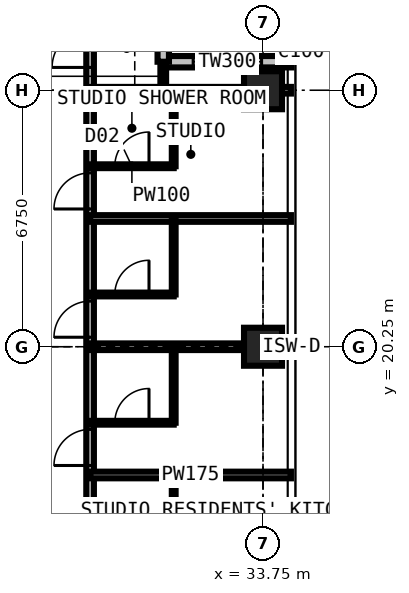
"""IFC4 building model, lengths in metres.
Left out: names, types, materials, properties, quantities, classifications, styles, units other than length and angle.
Written with IfcOpenShell. Run it as: python <this file> out.ifc"""

import sys

from ifc_helpers import new_model, si_unit, direction, frame, frame_2d, origin, origin_2d, place, context, subcontext, project, spatial, rectangle, extrude, element, fill, save


model = new_model("IFC4")
c1 = context("Model", 3, precision=1e-05, world=origin(), true_north=direction((0.0, 1.0)))
c2 = subcontext(c1, "Body", "Model", "MODEL_VIEW")
j1 = project(units=[si_unit("LENGTHUNIT", "METRE"), si_unit("PLANEANGLEUNIT", "RADIAN")], contexts=[c1])
p1 = place(None, origin())
s1 = spatial("IfcSite", under=j1, at=p1, CompositionType="ELEMENT")
p2 = place(p1, origin())
s2 = spatial("IfcBuilding", under=s1, at=p2, CompositionType="ELEMENT")
p3 = place(p2, frame((0.0, 0.0, 247.5)))
s3 = spatial("IfcBuildingStorey", under=s2, at=p3, CompositionType="ELEMENT", Elevation=247.5)
for number, where, z_axis, x_axis in (
    (1, (33.75, 20.25, 0.0), (0.0, 0.0, 1.0), (1.0, 0.0, 0.0)),
    (2, (33.75, 27.0, 0.0), (0.0, 0.0, 1.0), (1.0, 0.0, 0.0)),
):
    element("IfcColumn", number, at=place(p3, frame(where, z_axis=z_axis, x_axis=x_axis)), inside=s3, PredefinedType="COLUMN", context=c2, shape_type="SweptSolid", body=[
        extrude(rectangle(XDim=1.0, YDim=1.0, at=origin_2d()), origin(), (0.0, 0.0, 1.0), 3.6),
    ])
p4 = place(p3, frame((34.5, 27.75, 0.0), z_axis=(0.0, 0.0, 1.0), x_axis=(-1.0, 0.0, 0.0)))
e3 = element("IfcWall", 3, at=p4, inside=s3, PredefinedType="SOLIDWALL", context=c2, shape_type="SweptSolid", body=[
    extrude(rectangle(XDim=3.375, YDim=0.3, at=frame_2d((1.688, 0.0))), origin(), (0.0, 0.0, 1.0), 3.375),
])
p5 = place(p4, frame((0.788, 0.0, 0.6)))
e4 = element("IfcOpeningElement", 4, at=p5, cuts=e3, PredefinedType="OPENING", context=c2, shape_type="SweptSolid", body=[
    extrude(rectangle(XDim=1.8, YDim=2.1, at=frame_2d((0.9, 1.05))), frame((0.0, 0.16, 0.0), z_axis=(0.0, -1.0, 0.0), x_axis=(1.0, 0.0, 0.0)), (0.0, 0.0, 1.0), 0.32),
])
p6 = place(p3, frame((31.125, 27.75, 0.0), z_axis=(0.0, 0.0, 1.0), x_axis=(0.0, 1.0, 0.0)))
e5 = element("IfcWall", 5, at=p6, inside=s3, PredefinedType="SOLIDWALL", context=c2, shape_type="SweptSolid", body=[
    extrude(rectangle(XDim=3.375, YDim=0.3, at=frame_2d((1.688, 0.0))), origin(), (0.0, 0.0, 1.0), 3.375),
])
p7 = place(p6, frame((1.663, 0.0, 0.9)))
e6 = element("IfcOpeningElement", 6, at=p7, cuts=e5, PredefinedType="OPENING", context=c2, shape_type="SweptSolid", body=[
    extrude(rectangle(XDim=1.5, YDim=1.8, at=frame_2d((0.75, 0.9))), frame((0.0, 0.16, 0.0), z_axis=(0.0, -1.0, 0.0), x_axis=(1.0, 0.0, 0.0)), (0.0, 0.0, 1.0), 0.32),
])
p8 = place(p3, frame((29.2, 11.3, 0.0), z_axis=(0.0, 0.0, 1.0), x_axis=(0.0, 1.0, 0.0)))
e7 = element("IfcWall", 7, at=p8, inside=s3, PredefinedType="PARTITIONING", context=c2, shape_type="SweptSolid", body=[
    extrude(rectangle(XDim=17.9, YDim=0.2, at=frame_2d((8.95, 0.0))), origin(), (0.0, 0.0, 1.0), 3.375),
])
p9 = place(p8, frame((0.6, 0.0, 0.0)))
e8 = element("IfcOpeningElement", 8, at=p9, cuts=e7, PredefinedType="OPENING", context=c2, shape_type="SweptSolid", body=[
    extrude(rectangle(XDim=1.0, YDim=2.2, at=frame_2d((0.5, 1.1))), frame((0.0, 0.11, 0.0), z_axis=(0.0, -1.0, 0.0), x_axis=(1.0, 0.0, 0.0)), (0.0, 0.0, 1.0), 0.22),
])
p10 = place(p8, frame((2.4, 0.0, 0.0)))
e9 = element("IfcOpeningElement", 9, at=p10, cuts=e7, PredefinedType="OPENING", context=c2, shape_type="SweptSolid", body=[
    extrude(rectangle(XDim=0.95, YDim=2.2, at=frame_2d((0.475, 1.1))), frame((0.0, 0.11, 0.0), z_axis=(0.0, -1.0, 0.0), x_axis=(1.0, 0.0, 0.0)), (0.0, 0.0, 1.0), 0.22),
])
p11 = place(p8, frame((5.825, 0.0, 0.0)))
e10 = element("IfcOpeningElement", 10, at=p11, cuts=e7, PredefinedType="OPENING", context=c2, shape_type="SweptSolid", body=[
    extrude(rectangle(XDim=0.95, YDim=2.2, at=frame_2d((0.475, 1.1))), frame((0.0, 0.11, 0.0), z_axis=(0.0, -1.0, 0.0), x_axis=(1.0, 0.0, 0.0)), (0.0, 0.0, 1.0), 0.22),
])
p12 = place(p8, frame((9.2, 0.0, 0.0)))
e11 = element("IfcOpeningElement", 11, at=p12, cuts=e7, PredefinedType="OPENING", context=c2, shape_type="SweptSolid", body=[
    extrude(rectangle(XDim=0.95, YDim=2.2, at=frame_2d((0.475, 1.1))), frame((0.0, 0.11, 0.0), z_axis=(0.0, -1.0, 0.0), x_axis=(1.0, 0.0, 0.0)), (0.0, 0.0, 1.0), 0.22),
])
p13 = place(p8, frame((12.575, 0.0, 0.0)))
e12 = element("IfcOpeningElement", 12, at=p13, cuts=e7, PredefinedType="OPENING", context=c2, shape_type="SweptSolid", body=[
    extrude(rectangle(XDim=0.95, YDim=2.2, at=frame_2d((0.475, 1.1))), frame((0.0, 0.11, 0.0), z_axis=(0.0, -1.0, 0.0), x_axis=(1.0, 0.0, 0.0)), (0.0, 0.0, 1.0), 0.22),
])
p14 = place(p8, frame((16.3, 0.0, 0.0)))
e13 = element("IfcOpeningElement", 13, at=p14, cuts=e7, PredefinedType="OPENING", context=c2, shape_type="SweptSolid", body=[
    extrude(rectangle(XDim=1.0, YDim=2.2, at=frame_2d((0.5, 1.1))), frame((0.0, 0.11, 0.0), z_axis=(0.0, -1.0, 0.0), x_axis=(1.0, 0.0, 0.0)), (0.0, 0.0, 1.0), 0.22),
])
p15 = place(p3, frame((29.2, 16.875, 0.0), z_axis=(0.0, 0.0, 1.0), x_axis=(1.0, 0.0, 0.0)))
e14 = element("IfcWall", 14, at=p15, inside=s3, PredefinedType="PARTITIONING", context=c2, shape_type="SweptSolid", body=[
    extrude(rectangle(XDim=5.284, YDim=0.175, at=frame_2d((2.642, 0.0))), origin(), (0.0, 0.0, 1.0), 3.375),
])
p16 = place(p3, frame((29.2, 18.25, 0.0), z_axis=(0.0, 0.0, 1.0), x_axis=(1.0, 0.0, 0.0)))
e15 = element("IfcWall", 15, at=p16, inside=s3, PredefinedType="PARTITIONING", context=c2, shape_type="SweptSolid", body=[
    extrude(rectangle(XDim=2.2, YDim=0.1, at=frame_2d((1.1, 0.0))), origin(), (0.0, 0.0, 1.0), 3.375),
])
p17 = place(p16, frame((0.65, 0.0, 0.0)))
e16 = element("IfcOpeningElement", 16, at=p17, cuts=e15, PredefinedType="OPENING", context=c2, shape_type="SweptSolid", body=[
    extrude(rectangle(XDim=0.9, YDim=2.2, at=frame_2d((0.45, 1.1))), frame((0.0, 0.06, 0.0), z_axis=(0.0, -1.0, 0.0), x_axis=(1.0, 0.0, 0.0)), (0.0, 0.0, 1.0), 0.12),
])
p18 = place(p3, frame((29.2, 20.25, 0.0), z_axis=(0.0, 0.0, 1.0), x_axis=(1.0, 0.0, 0.0)))
e17 = element("IfcWall", 17, at=p18, inside=s3, PredefinedType="PARTITIONING", context=c2, shape_type="SweptSolid", body=[
    extrude(rectangle(XDim=5.284, YDim=0.175, at=frame_2d((2.642, 0.0))), origin(), (0.0, 0.0, 1.0), 2.877),
])
p19 = place(p3, frame((29.2, 21.625, 0.0), z_axis=(0.0, 0.0, 1.0), x_axis=(1.0, 0.0, 0.0)))
e18 = element("IfcWall", 18, at=p19, inside=s3, PredefinedType="PARTITIONING", context=c2, shape_type="SweptSolid", body=[
    extrude(rectangle(XDim=2.2, YDim=0.1, at=frame_2d((1.1, 0.0))), origin(), (0.0, 0.0, 1.0), 3.375),
])
p20 = place(p19, frame((0.65, 0.0, 0.0)))
e19 = element("IfcOpeningElement", 19, at=p20, cuts=e18, PredefinedType="OPENING", context=c2, shape_type="SweptSolid", body=[
    extrude(rectangle(XDim=0.9, YDim=2.2, at=frame_2d((0.45, 1.1))), frame((0.0, 0.06, 0.0), z_axis=(0.0, -1.0, 0.0), x_axis=(1.0, 0.0, 0.0)), (0.0, 0.0, 1.0), 0.12),
])
p21 = place(p3, frame((29.2, 23.625, 0.0), z_axis=(0.0, 0.0, 1.0), x_axis=(1.0, 0.0, 0.0)))
e20 = element("IfcWall", 20, at=p21, inside=s3, PredefinedType="PARTITIONING", context=c2, shape_type="SweptSolid", body=[
    extrude(rectangle(XDim=5.284, YDim=0.175, at=frame_2d((2.642, 0.0))), origin(), (0.0, 0.0, 1.0), 3.375),
])
p22 = place(p3, frame((29.2, 25.0, 0.0), z_axis=(0.0, 0.0, 1.0), x_axis=(1.0, 0.0, 0.0)))
e21 = element("IfcWall", 21, at=p22, inside=s3, PredefinedType="PARTITIONING", context=c2, shape_type="SweptSolid", body=[
    extrude(rectangle(XDim=2.2, YDim=0.1, at=frame_2d((1.1, 0.0))), origin(), (0.0, 0.0, 1.0), 3.375),
])
p23 = place(p22, frame((0.65, 0.0, 0.0)))
e22 = element("IfcOpeningElement", 22, at=p23, cuts=e21, PredefinedType="OPENING", context=c2, shape_type="SweptSolid", body=[
    extrude(rectangle(XDim=0.9, YDim=2.2, at=frame_2d((0.45, 1.1))), frame((0.0, 0.06, 0.0), z_axis=(0.0, -1.0, 0.0), x_axis=(1.0, 0.0, 0.0)), (0.0, 0.0, 1.0), 0.12),
])
p24 = place(p3, frame((29.2, 27.0, 0.0), z_axis=(0.0, 0.0, 1.0), x_axis=(1.0, 0.0, 0.0)))
e23 = element("IfcWall", 23, at=p24, inside=s3, PredefinedType="PARTITIONING", context=c2, shape_type="SweptSolid", body=[
    extrude(rectangle(XDim=5.284, YDim=0.175, at=frame_2d((2.642, 0.0))), origin(), (0.0, 0.0, 1.0), 2.877),
])
p25 = place(p3, frame((31.125, 27.0, 0.0), z_axis=(0.0, 0.0, 1.0), x_axis=(0.0, 1.0, 0.0)))
e24 = element("IfcWall", 24, at=p25, inside=s3, PredefinedType="PARTITIONING", context=c2, shape_type="SweptSolid", body=[
    extrude(rectangle(XDim=0.734, YDim=0.15, at=frame_2d((0.367, 0.0))), origin(), (0.0, 0.0, 1.0), 3.375),
])
for number, where, z_axis, x_axis in (
    (25, (31.4, 14.875, 0.0), (0.0, 0.0, 1.0), (0.0, 1.0, 0.0)),
    (26, (31.4, 18.25, 0.0), (0.0, 0.0, 1.0), (0.0, 1.0, 0.0)),
    (27, (31.4, 21.625, 0.0), (0.0, 0.0, 1.0), (0.0, 1.0, 0.0)),
    (28, (31.4, 25.0, 0.0), (0.0, 0.0, 1.0), (0.0, 1.0, 0.0)),
):
    element("IfcWall", number, at=place(p3, frame(where, z_axis=z_axis, x_axis=x_axis)), inside=s3, PredefinedType="PARTITIONING", context=c2, shape_type="SweptSolid", body=[
        extrude(rectangle(XDim=2.0, YDim=0.1, at=frame_2d((1.0, 0.0))), origin(), (0.0, 0.0, 1.0), 3.375),
    ])
p26 = place(p5, origin())
e29 = element("IfcWindow", 29, at=p26, inside=s3, PartitioningType="SINGLE_PANEL", PredefinedType="WINDOW", context=c2, shape_type="SweptSolid", body=[
    extrude(rectangle(XDim=1.8, YDim=2.1, at=frame_2d((0.9, 1.05))), frame((0.0, 0.03, 0.0), z_axis=(0.0, -1.0, 0.0), x_axis=(1.0, 0.0, 0.0)), (0.0, 0.0, 1.0), 0.06),
])
fill(e4, e29)
p27 = place(p11, origin())
e30 = element("IfcDoor", 30, at=p27, inside=s3, OperationType="SINGLE_SWING_LEFT", PredefinedType="DOOR", context=c2, shape_type="SweptSolid", body=[
    extrude(rectangle(XDim=0.95, YDim=2.2, at=frame_2d((0.475, 1.1))), frame((0.0, 0.025, 0.0), z_axis=(0.0, -1.0, 0.0), x_axis=(1.0, 0.0, 0.0)), (0.0, 0.0, 1.0), 0.05),
])
fill(e10, e30)
p28 = place(p17, origin())
e31 = element("IfcDoor", 31, at=p28, inside=s3, OperationType="SINGLE_SWING_RIGHT", PredefinedType="DOOR", context=c2, shape_type="SweptSolid", body=[
    extrude(rectangle(XDim=0.9, YDim=2.2, at=frame_2d((0.45, 1.1))), frame((0.0, 0.025, 0.0), z_axis=(0.0, -1.0, 0.0), x_axis=(1.0, 0.0, 0.0)), (0.0, 0.0, 1.0), 0.05),
])
fill(e16, e31)
p29 = place(p12, origin())
e32 = element("IfcDoor", 32, at=p29, inside=s3, OperationType="SINGLE_SWING_LEFT", PredefinedType="DOOR", context=c2, shape_type="SweptSolid", body=[
    extrude(rectangle(XDim=0.95, YDim=2.2, at=frame_2d((0.475, 1.1))), frame((0.0, 0.025, 0.0), z_axis=(0.0, -1.0, 0.0), x_axis=(1.0, 0.0, 0.0)), (0.0, 0.0, 1.0), 0.05),
])
fill(e11, e32)
p30 = place(p20, origin())
e33 = element("IfcDoor", 33, at=p30, inside=s3, OperationType="SINGLE_SWING_RIGHT", PredefinedType="DOOR", context=c2, shape_type="SweptSolid", body=[
    extrude(rectangle(XDim=0.9, YDim=2.2, at=frame_2d((0.45, 1.1))), frame((0.0, 0.025, 0.0), z_axis=(0.0, -1.0, 0.0), x_axis=(1.0, 0.0, 0.0)), (0.0, 0.0, 1.0), 0.05),
])
fill(e19, e33)
p31 = place(p13, origin())
e34 = element("IfcDoor", 34, at=p31, inside=s3, OperationType="SINGLE_SWING_LEFT", PredefinedType="DOOR", context=c2, shape_type="SweptSolid", body=[
    extrude(rectangle(XDim=0.95, YDim=2.2, at=frame_2d((0.475, 1.1))), frame((0.0, 0.025, 0.0), z_axis=(0.0, -1.0, 0.0), x_axis=(1.0, 0.0, 0.0)), (0.0, 0.0, 1.0), 0.05),
])
fill(e12, e34)
p32 = place(p23, origin())
e35 = element("IfcDoor", 35, at=p32, inside=s3, OperationType="SINGLE_SWING_RIGHT", PredefinedType="DOOR", context=c2, shape_type="SweptSolid", body=[
    extrude(rectangle(XDim=0.9, YDim=2.2, at=frame_2d((0.45, 1.1))), frame((0.0, 0.025, 0.0), z_axis=(0.0, -1.0, 0.0), x_axis=(1.0, 0.0, 0.0)), (0.0, 0.0, 1.0), 0.05),
])
fill(e22, e35)
p33 = place(p14, origin())
e36 = element("IfcDoor", 36, at=p33, inside=s3, OperationType="SINGLE_SWING_LEFT", PredefinedType="DOOR", context=c2, shape_type="SweptSolid", body=[
    extrude(rectangle(XDim=1.0, YDim=2.2, at=frame_2d((0.5, 1.1))), frame((0.0, 0.025, 0.0), z_axis=(0.0, -1.0, 0.0), x_axis=(1.0, 0.0, 0.0)), (0.0, 0.0, 1.0), 0.05),
])
fill(e13, e36)
save(model, sys.argv[1])
